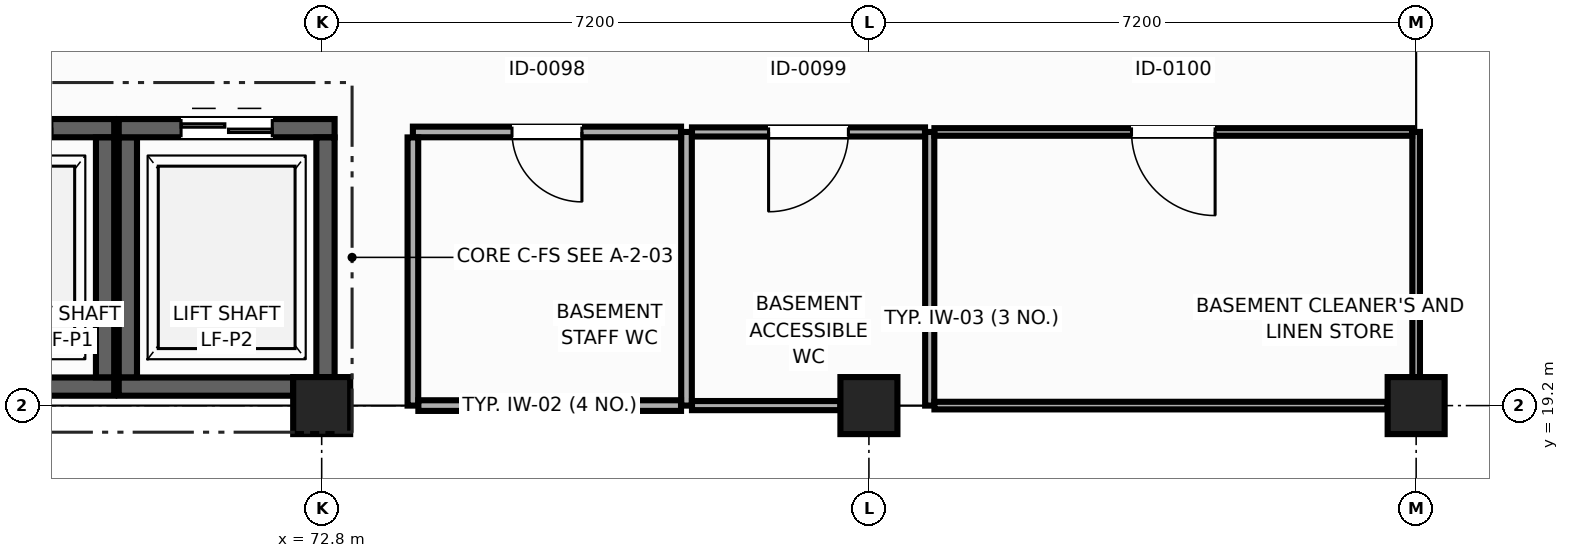
"""IFC4 building model, lengths in metres.
Left out: names, types, materials, properties, quantities, classifications, styles, units other than length and angle.
Written with IfcOpenShell. Run it as: python <this file> out.ifc"""

import sys

from ifc_helpers import new_model, si_unit, direction, frame, frame_2d, origin, origin_2d, place, context, subcontext, project, spatial, rectangle, extrude, element, fill, save


model = new_model("IFC4")
c1 = context("Model", 3, precision=1e-05, world=origin(), true_north=direction((0.0, 1.0)))
c2 = subcontext(c1, "Body", "Model", "MODEL_VIEW")
j1 = project(units=[si_unit("LENGTHUNIT", "METRE"), si_unit("PLANEANGLEUNIT", "RADIAN")], contexts=[c1])
p1 = place(None, origin())
s1 = spatial("IfcSite", under=j1, at=p1, CompositionType="ELEMENT")
p2 = place(p1, origin())
s2 = spatial("IfcBuilding", under=s1, at=p2, CompositionType="ELEMENT")
p3 = place(p2, frame((0.0, 0.0, -4.8)))
s3 = spatial("IfcBuildingStorey", under=s2, at=p3, CompositionType="ELEMENT", Elevation=-4.8)
for number, where, z_axis, x_axis in (
    (1, (72.8, 19.2, 0.0), (0.0, 0.0, 1.0), (1.0, 0.0, 0.0)),
    (2, (80.0, 19.2, 0.0), (0.0, 0.0, 1.0), (0.0, 1.0, 0.0)),
    (3, (87.2, 19.2, 0.0), (0.0, 0.0, 1.0), (1.0, 0.0, 0.0)),
):
    element("IfcColumn", number, at=place(p3, frame(where, z_axis=z_axis, x_axis=x_axis)), inside=s3, PredefinedType="COLUMN", context=c2, shape_type="SweptSolid", body=[
        extrude(rectangle(XDim=0.75, YDim=0.75, at=origin_2d()), origin(), (0.0, 0.0, 1.0), 4.8),
    ])
p4 = place(p3, frame((70.07, 19.45, 0.0), z_axis=(0.0, 0.0, 1.0), x_axis=(-1.0, 0.0, 0.0)))
e4 = element("IfcWall", 4, at=p4, inside=s3, PredefinedType="SHEAR", context=c2, shape_type="SweptSolid", body=[
    extrude(rectangle(XDim=2.84, YDim=0.24, at=frame_2d((1.42, 0.0))), origin(), (0.0, 0.0, 1.0), 4.48),
])
p5 = place(p3, frame((67.23, 22.85, 0.0), z_axis=(0.0, 0.0, 1.0), x_axis=(1.0, 0.0, 0.0)))
e5 = element("IfcWall", 5, at=p5, inside=s3, PredefinedType="SHEAR", context=c2, shape_type="SweptSolid", body=[
    extrude(rectangle(XDim=2.84, YDim=0.24, at=frame_2d((1.42, 0.0))), origin(), (0.0, 0.0, 1.0), 4.48),
])
p6 = place(p5, frame((0.82, 0.0, 0.0)))
e6 = element("IfcOpeningElement", 6, at=p6, cuts=e5, PredefinedType="OPENING", context=c2, shape_type="SweptSolid", body=[
    extrude(rectangle(XDim=1.2, YDim=2.15, at=frame_2d((0.6, 1.075))), frame((0.0, 0.13, 0.0), z_axis=(0.0, -1.0, 0.0), x_axis=(1.0, 0.0, 0.0)), (0.0, 0.0, 1.0), 0.26),
])
p7 = place(p3, frame((69.95, 22.728, 0.0), z_axis=(0.0, 0.0, 1.0), x_axis=(0.0, -1.0, 0.0)))
e7 = element("IfcWall", 7, at=p7, inside=s3, PredefinedType="SHEAR", context=c2, shape_type="SweptSolid", body=[
    extrude(rectangle(XDim=3.156, YDim=0.24, at=frame_2d((1.578, 0.0))), origin(), (0.0, 0.0, 1.0), 4.48),
])
p8 = place(p3, frame((72.425, 19.45, 0.0), z_axis=(0.0, 0.0, 1.0), x_axis=(-1.0, 0.0, 0.0)))
e8 = element("IfcWall", 8, at=p8, inside=s3, PredefinedType="SHEAR", context=c2, shape_type="SweptSolid", body=[
    extrude(rectangle(XDim=2.295, YDim=0.24, at=frame_2d((1.147, 0.0))), origin(), (0.0, 0.0, 1.0), 4.48),
])
p9 = place(p3, frame((70.25, 19.572, 0.0), z_axis=(0.0, 0.0, 1.0), x_axis=(0.0, 1.0, 0.0)))
e9 = element("IfcWall", 9, at=p9, inside=s3, PredefinedType="SHEAR", context=c2, shape_type="SweptSolid", body=[
    extrude(rectangle(XDim=3.158, YDim=0.24, at=frame_2d((1.579, 0.0))), origin(), (0.0, 0.0, 1.0), 4.48),
])
p10 = place(p3, frame((70.13, 22.85, 0.0), z_axis=(0.0, 0.0, 1.0), x_axis=(1.0, 0.0, 0.0)))
e10 = element("IfcWall", 10, at=p10, inside=s3, PredefinedType="SHEAR", context=c2, shape_type="SweptSolid", body=[
    extrude(rectangle(XDim=2.84, YDim=0.24, at=frame_2d((1.42, 0.0))), origin(), (0.0, 0.0, 1.0), 4.48),
])
p11 = place(p10, frame((0.82, 0.0, 0.0)))
e11 = element("IfcOpeningElement", 11, at=p11, cuts=e10, PredefinedType="OPENING", context=c2, shape_type="SweptSolid", body=[
    extrude(rectangle(XDim=1.2, YDim=2.15, at=frame_2d((0.6, 1.075))), frame((0.0, 0.13, 0.0), z_axis=(0.0, -1.0, 0.0), x_axis=(1.0, 0.0, 0.0)), (0.0, 0.0, 1.0), 0.26),
])
p12 = place(p3, frame((72.85, 22.728, 0.0), z_axis=(0.0, 0.0, 1.0), x_axis=(0.0, -1.0, 0.0)))
e12 = element("IfcWall", 12, at=p12, inside=s3, PredefinedType="SHEAR", context=c2, shape_type="SweptSolid", body=[
    extrude(rectangle(XDim=3.153, YDim=0.24, at=frame_2d((1.577, 0.0))), origin(), (0.0, 0.0, 1.0), 4.48),
])
p13 = place(p3, frame((77.6, 19.2, 0.0), z_axis=(0.0, 0.0, 1.0), x_axis=(0.0, 1.0, 0.0)))
e13 = element("IfcWall", 13, at=p13, inside=s3, PredefinedType="PARTITIONING", context=c2, shape_type="SweptSolid", body=[
    extrude(rectangle(XDim=3.6, YDim=0.14, at=frame_2d((1.8, 0.0))), origin(), (0.0, 0.0, 1.0), 3.775),
])
p14 = place(p3, frame((77.528, 22.8, 0.0), z_axis=(0.0, 0.0, 1.0), x_axis=(-1.0, 0.0, 0.0)))
e14 = element("IfcWall", 14, at=p14, inside=s3, PredefinedType="PARTITIONING", context=c2, shape_type="SweptSolid", body=[
    extrude(rectangle(XDim=3.528, YDim=0.14, at=frame_2d((1.764, 0.0))), origin(), (0.0, 0.0, 1.0), 4.48),
])
p15 = place(p14, frame((1.304, 0.0, 0.0)))
e15 = element("IfcOpeningElement", 15, at=p15, cuts=e14, PredefinedType="OPENING", context=c2, shape_type="SweptSolid", body=[
    extrude(rectangle(XDim=0.92, YDim=2.1, at=frame_2d((0.46, 1.05))), frame((0.0, 0.08, 0.0), z_axis=(0.0, -1.0, 0.0), x_axis=(1.0, 0.0, 0.0)), (0.0, 0.0, 1.0), 0.16),
])
p16 = place(p3, frame((74.0, 22.728, 0.0), z_axis=(0.0, 0.0, 1.0), x_axis=(0.0, -1.0, 0.0)))
e16 = element("IfcWall", 16, at=p16, inside=s3, PredefinedType="PARTITIONING", context=c2, shape_type="SweptSolid", body=[
    extrude(rectangle(XDim=3.528, YDim=0.14, at=frame_2d((1.764, 0.0))), origin(), (0.0, 0.0, 1.0), 3.775),
])
p17 = place(p3, frame((74.072, 19.2, 0.0), z_axis=(0.0, 0.0, 1.0), x_axis=(1.0, 0.0, 0.0)))
e17 = element("IfcWall", 17, at=p17, inside=s3, PredefinedType="PARTITIONING", context=c2, shape_type="SweptSolid", body=[
    extrude(rectangle(XDim=3.456, YDim=0.14, at=frame_2d((1.728, 0.0))), origin(), (0.0, 0.0, 1.0), 3.775),
])
p18 = place(p3, frame((80.8, 19.2, 0.0), z_axis=(0.0, 0.0, 1.0), x_axis=(0.0, 1.0, 0.0)))
e18 = element("IfcWall", 18, at=p18, inside=s3, PredefinedType="PARTITIONING", context=c2, shape_type="SweptSolid", body=[
    extrude(rectangle(XDim=3.6, YDim=0.12, at=frame_2d((1.8, 0.0))), origin(), (0.0, 0.0, 1.0), 3.775),
])
p19 = place(p3, frame((80.738, 22.8, 0.0), z_axis=(0.0, 0.0, 1.0), x_axis=(-1.0, 0.0, 0.0)))
e19 = element("IfcWall", 19, at=p19, inside=s3, PredefinedType="PARTITIONING", context=c2, shape_type="SweptSolid", body=[
    extrude(rectangle(XDim=3.066, YDim=0.12, at=frame_2d((1.533, 0.0))), origin(), (0.0, 0.0, 1.0), 3.675),
])
p20 = place(p19, frame((1.008, 0.0, 0.0)))
e20 = element("IfcOpeningElement", 20, at=p20, cuts=e19, PredefinedType="OPENING", context=c2, shape_type="SweptSolid", body=[
    extrude(rectangle(XDim=1.05, YDim=2.12, at=frame_2d((0.525, 1.06))), frame((0.0, 0.07, 0.0), z_axis=(0.0, -1.0, 0.0), x_axis=(1.0, 0.0, 0.0)), (0.0, 0.0, 1.0), 0.14),
])
p21 = place(p3, frame((77.672, 19.2, 0.0), z_axis=(0.0, 0.0, 1.0), x_axis=(1.0, 0.0, 0.0)))
e21 = element("IfcWall", 21, at=p21, inside=s3, PredefinedType="PARTITIONING", context=c2, shape_type="SweptSolid", body=[
    extrude(rectangle(XDim=1.953, YDim=0.12, at=frame_2d((0.977, 0.0))), origin(), (0.0, 0.0, 1.0), 3.775),
])
p22 = place(p3, frame((87.2, 19.575, 0.0), z_axis=(0.0, 0.0, 1.0), x_axis=(0.0, 1.0, 0.0)))
e22 = element("IfcWall", 22, at=p22, inside=s3, PredefinedType="PARTITIONING", context=c2, shape_type="SweptSolid", body=[
    extrude(rectangle(XDim=3.225, YDim=0.1, at=frame_2d((1.613, 0.0))), origin(), (0.0, 0.0, 1.0), 3.675),
])
p23 = place(p3, frame((87.148, 22.8, 0.0), z_axis=(0.0, 0.0, 1.0), x_axis=(-1.0, 0.0, 0.0)))
e23 = element("IfcWall", 23, at=p23, inside=s3, PredefinedType="PARTITIONING", context=c2, shape_type="SweptSolid", body=[
    extrude(rectangle(XDim=6.286, YDim=0.1, at=frame_2d((3.143, 0.0))), origin(), (0.0, 0.0, 1.0), 4.48),
])
p24 = place(p23, frame((2.593, 0.0, 0.0)))
e24 = element("IfcOpeningElement", 24, at=p24, cuts=e23, PredefinedType="OPENING", context=c2, shape_type="SweptSolid", body=[
    extrude(rectangle(XDim=1.1, YDim=2.15, at=frame_2d((0.55, 1.075))), frame((0.0, 0.06, 0.0), z_axis=(0.0, -1.0, 0.0), x_axis=(1.0, 0.0, 0.0)), (0.0, 0.0, 1.0), 0.12),
])
p25 = place(p3, frame((80.862, 19.2, 0.0), z_axis=(0.0, 0.0, 1.0), x_axis=(1.0, 0.0, 0.0)))
e25 = element("IfcWall", 25, at=p25, inside=s3, PredefinedType="PARTITIONING", context=c2, shape_type="SweptSolid", body=[
    extrude(rectangle(XDim=5.963, YDim=0.1, at=frame_2d((2.981, 0.0))), origin(), (0.0, 0.0, 1.0), 3.775),
])
p26 = place(p6, origin())
e26 = element("IfcDoor", 26, at=p26, inside=s3, OperationType="DOUBLE_DOOR_SLIDING", PredefinedType="DOOR", context=c2, shape_type="SweptSolid", body=[
    extrude(rectangle(XDim=1.2, YDim=2.15, at=frame_2d((0.6, 1.075))), frame((0.0, 0.025, 0.0), z_axis=(0.0, -1.0, 0.0), x_axis=(1.0, 0.0, 0.0)), (0.0, 0.0, 1.0), 0.05),
])
fill(e6, e26)
p27 = place(p11, origin())
e27 = element("IfcDoor", 27, at=p27, inside=s3, OperationType="DOUBLE_DOOR_SLIDING", PredefinedType="DOOR", context=c2, shape_type="SweptSolid", body=[
    extrude(rectangle(XDim=1.2, YDim=2.15, at=frame_2d((0.6, 1.075))), frame((0.0, 0.025, 0.0), z_axis=(0.0, -1.0, 0.0), x_axis=(1.0, 0.0, 0.0)), (0.0, 0.0, 1.0), 0.05),
])
fill(e11, e27)
p28 = place(p15, origin())
e28 = element("IfcDoor", 28, at=p28, inside=s3, OperationType="SINGLE_SWING_LEFT", PredefinedType="DOOR", context=c2, shape_type="SweptSolid", body=[
    extrude(rectangle(XDim=0.92, YDim=2.1, at=frame_2d((0.46, 1.05))), frame((0.0, 0.025, 0.0), z_axis=(0.0, -1.0, 0.0), x_axis=(1.0, 0.0, 0.0)), (0.0, 0.0, 1.0), 0.05),
])
fill(e15, e28)
p29 = place(p20, origin())
e29 = element("IfcDoor", 29, at=p29, inside=s3, OperationType="SINGLE_SWING_RIGHT", PredefinedType="DOOR", context=c2, shape_type="SweptSolid", body=[
    extrude(rectangle(XDim=1.05, YDim=2.12, at=frame_2d((0.525, 1.06))), frame((0.0, 0.025, 0.0), z_axis=(0.0, -1.0, 0.0), x_axis=(1.0, 0.0, 0.0)), (0.0, 0.0, 1.0), 0.05),
])
fill(e20, e29)
p30 = place(p24, origin())
e30 = element("IfcDoor", 30, at=p30, inside=s3, OperationType="SINGLE_SWING_LEFT", PredefinedType="DOOR", context=c2, shape_type="SweptSolid", body=[
    extrude(rectangle(XDim=1.1, YDim=2.15, at=frame_2d((0.55, 1.075))), frame((0.0, 0.025, 0.0), z_axis=(0.0, -1.0, 0.0), x_axis=(1.0, 0.0, 0.0)), (0.0, 0.0, 1.0), 0.05),
])
fill(e24, e30)
save(model, sys.argv[1])
